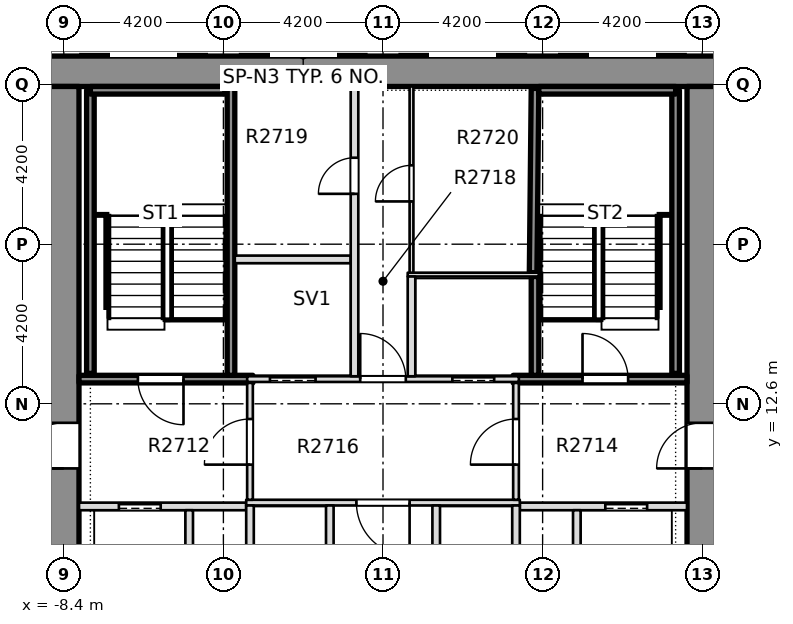
"""IFC4 building model, lengths in metres.
Left out: names, types, materials, properties, quantities, classifications, styles, units other than length and angle.
Written with IfcOpenShell. Run it as: python <this file> out.ifc"""

import sys

from ifc_helpers import new_model, si_unit, direction, frame, frame_2d, origin, place, context, subcontext, project, spatial, rectangle, extrude, element, fill, save


model = new_model("IFC4")
c1 = context("Model", 3, precision=1e-05, world=origin(), true_north=direction((0.0, 1.0)))
c2 = subcontext(c1, "Body", "Model", "MODEL_VIEW")
j1 = project(units=[si_unit("LENGTHUNIT", "METRE"), si_unit("PLANEANGLEUNIT", "RADIAN")], contexts=[c1])
p1 = place(None, origin())
s1 = spatial("IfcSite", under=j1, at=p1, CompositionType="ELEMENT")
p2 = place(p1, origin())
s2 = spatial("IfcBuilding", under=s1, at=p2, CompositionType="ELEMENT")
p3 = place(p2, frame((0.0, 0.0, 108.0)))
s3 = spatial("IfcBuildingStorey", under=s2, at=p3, CompositionType="ELEMENT", Elevation=108.0)
p4 = place(p3, frame((-11.8, 21.35, -0.32), z_axis=(0.0, 0.0, 1.0), x_axis=(1.0, 0.0, 0.0)))
e1 = element("IfcWall", 1, at=p4, inside=s3, PredefinedType="SHEAR", context=c2, shape_type="SweptSolid", body=[
    extrude(rectangle(XDim=23.6, YDim=0.8, at=frame_2d((11.8, 0.0))), origin(), (0.0, 0.0, 1.0), 3.45),
])
p5 = place(p3, frame((-8.4, -7.6, -0.32), z_axis=(0.0, 0.0, 1.0), x_axis=(0.0, 1.0, 0.0)))
e2 = element("IfcWall", 2, at=p5, inside=s3, PredefinedType="SHEAR", context=c2, shape_type="SweptSolid", body=[
    extrude(rectangle(XDim=28.55, YDim=0.8, at=frame_2d((14.275, 0.0))), origin(), (0.0, 0.0, 1.0), 3.45),
])
p6 = place(p5, frame((18.5, 0.0, 0.32)))
e3 = element("IfcOpeningElement", 3, at=p6, cuts=e2, PredefinedType="OPENING", context=c2, shape_type="SweptSolid", body=[
    extrude(rectangle(XDim=1.2, YDim=2.1, at=frame_2d((0.6, 1.05))), frame((0.0, 0.41, 0.0), z_axis=(0.0, -1.0, 0.0), x_axis=(1.0, 0.0, 0.0)), (0.0, 0.0, 1.0), 0.82),
])
p7 = place(p3, frame((8.4, -7.6, -0.32), z_axis=(0.0, 0.0, 1.0), x_axis=(0.0, 1.0, 0.0)))
e4 = element("IfcWall", 4, at=p7, inside=s3, PredefinedType="SHEAR", context=c2, shape_type="SweptSolid", body=[
    extrude(rectangle(XDim=28.55, YDim=0.8, at=frame_2d((14.275, 0.0))), origin(), (0.0, 0.0, 1.0), 3.45),
])
p8 = place(p7, frame((18.5, 0.0, 0.32)))
e5 = element("IfcOpeningElement", 5, at=p8, cuts=e4, PredefinedType="OPENING", context=c2, shape_type="SweptSolid", body=[
    extrude(rectangle(XDim=1.2, YDim=2.1, at=frame_2d((0.6, 1.05))), frame((0.0, 0.41, 0.0), z_axis=(0.0, -1.0, 0.0), x_axis=(1.0, 0.0, 0.0)), (0.0, 0.0, 1.0), 0.82),
])
p9 = place(p3, frame((-7.999, 9.9, 0.0), z_axis=(0.0, 0.0, 1.0), x_axis=(1.0, 0.0, 0.0)))
e6 = element("IfcWall", 6, at=p9, inside=s3, PredefinedType="PARTITIONING", context=c2, shape_type="SweptSolid", body=[
    extrude(rectangle(XDim=4.399, YDim=0.2, at=frame_2d((2.199, 0.0))), origin(), (0.0, 0.0, 1.0), 3.13),
])
p10 = place(p9, frame((1.049, 0.0, 0.0)))
e7 = element("IfcOpeningElement", 7, at=p10, cuts=e6, PredefinedType="OPENING", context=c2, shape_type="SweptSolid", body=[
    extrude(rectangle(XDim=1.1, YDim=2.1, at=frame_2d((0.55, 1.05))), frame((0.0, 0.11, 0.0), z_axis=(0.0, -1.0, 0.0), x_axis=(1.0, 0.0, 0.0)), (0.0, 0.0, 1.0), 0.22),
])
p11 = place(p3, frame((3.6, 9.9, 0.0), z_axis=(0.0, 0.0, 1.0), x_axis=(1.0, 0.0, 0.0)))
e8 = element("IfcWall", 8, at=p11, inside=s3, PredefinedType="PARTITIONING", context=c2, shape_type="SweptSolid", body=[
    extrude(rectangle(XDim=4.399, YDim=0.2, at=frame_2d((2.199, 0.0))), origin(), (0.0, 0.0, 1.0), 3.13),
])
p12 = place(p11, frame((2.25, 0.0, 0.0)))
e9 = element("IfcOpeningElement", 9, at=p12, cuts=e8, PredefinedType="OPENING", context=c2, shape_type="SweptSolid", body=[
    extrude(rectangle(XDim=1.1, YDim=2.1, at=frame_2d((0.55, 1.05))), frame((0.0, 0.11, 0.0), z_axis=(0.0, -1.0, 0.0), x_axis=(1.0, 0.0, 0.0)), (0.0, 0.0, 1.0), 0.22),
])
p13 = place(p3, frame((-3.6, 10.0, 0.0), z_axis=(0.0, 0.0, 1.0), x_axis=(1.0, 0.0, 0.0)))
e10 = element("IfcWall", 10, at=p13, inside=s3, PredefinedType="PARTITIONING", context=c2, shape_type="SweptSolid", body=[
    extrude(rectangle(XDim=7.2, YDim=0.15, at=frame_2d((3.6, 0.0))), origin(), (0.0, 0.0, 1.0), 3.13),
])
p14 = place(p13, frame((2.9, 0.0, 0.0)))
e11 = element("IfcOpeningElement", 11, at=p14, cuts=e10, PredefinedType="OPENING", context=c2, shape_type="SweptSolid", body=[
    extrude(rectangle(XDim=1.4, YDim=2.1, at=frame_2d((0.7, 1.05))), frame((0.0, 0.085, 0.0), z_axis=(0.0, -1.0, 0.0), x_axis=(1.0, 0.0, 0.0)), (0.0, 0.0, 1.0), 0.17),
])
p15 = place(p3, frame((-7.999, 13.25, 0.0), z_axis=(0.0, 0.0, 1.0), x_axis=(1.0, 0.0, 0.0)))
e12 = element("IfcWall", 12, at=p15, inside=s3, PredefinedType="SOLIDWALL", context=c2, shape_type="SweptSolid", body=[
    extrude(rectangle(XDim=4.574, YDim=0.2, at=frame_2d((2.287, 0.0))), origin(), (0.0, 0.0, 1.0), 3.13),
])
p16 = place(p15, frame((1.549, 0.0, 0.0)))
e13 = element("IfcOpeningElement", 13, at=p16, cuts=e12, PredefinedType="OPENING", context=c2, shape_type="SweptSolid", body=[
    extrude(rectangle(XDim=1.2, YDim=2.1, at=frame_2d((0.6, 1.05))), frame((0.0, 0.11, 0.0), z_axis=(0.0, -1.0, 0.0), x_axis=(1.0, 0.0, 0.0)), (0.0, 0.0, 1.0), 0.22),
])
p17 = place(p3, frame((-3.575, 13.25, 0.0), z_axis=(0.0, 0.0, 1.0), x_axis=(1.0, 0.0, 0.0)))
e14 = element("IfcWall", 14, at=p17, inside=s3, PredefinedType="PARTITIONING", context=c2, shape_type="SweptSolid", body=[
    extrude(rectangle(XDim=7.15, YDim=0.15, at=frame_2d((3.575, 0.0))), origin(), (0.0, 0.0, 1.0), 3.13),
])
p18 = place(p17, frame((0.6, 0.0, 0.0)))
e15 = element("IfcOpeningElement", 15, at=p18, cuts=e14, PredefinedType="OPENING", context=c2, shape_type="SweptSolid", body=[
    extrude(rectangle(XDim=1.2, YDim=2.1, at=frame_2d((0.6, 1.05))), frame((0.0, 0.085, 0.0), z_axis=(0.0, -1.0, 0.0), x_axis=(1.0, 0.0, 0.0)), (0.0, 0.0, 1.0), 0.17),
])
p19 = place(p17, frame((5.4, 0.0, 0.0)))
e16 = element("IfcOpeningElement", 16, at=p19, cuts=e14, PredefinedType="OPENING", context=c2, shape_type="SweptSolid", body=[
    extrude(rectangle(XDim=1.1, YDim=2.1, at=frame_2d((0.55, 1.05))), frame((0.0, 0.085, 0.0), z_axis=(0.0, -1.0, 0.0), x_axis=(1.0, 0.0, 0.0)), (0.0, 0.0, 1.0), 0.17),
])
p20 = place(p17, frame((2.975, 0.0, 0.0)))
e17 = element("IfcOpeningElement", 17, at=p20, cuts=e14, PredefinedType="OPENING", context=c2, shape_type="SweptSolid", body=[
    extrude(rectangle(XDim=1.2, YDim=2.1, at=frame_2d((0.6, 1.05))), frame((0.0, 0.085, 0.0), z_axis=(0.0, -1.0, 0.0), x_axis=(1.0, 0.0, 0.0)), (0.0, 0.0, 1.0), 0.17),
])
p21 = place(p3, frame((3.425, 13.25, 0.0), z_axis=(0.0, 0.0, 1.0), x_axis=(1.0, 0.0, 0.0)))
e18 = element("IfcWall", 18, at=p21, inside=s3, PredefinedType="SOLIDWALL", context=c2, shape_type="SweptSolid", body=[
    extrude(rectangle(XDim=4.574, YDim=0.2, at=frame_2d((2.287, 0.0))), origin(), (0.0, 0.0, 1.0), 3.13),
])
p22 = place(p21, frame((1.825, 0.0, 0.0)))
e19 = element("IfcOpeningElement", 19, at=p22, cuts=e18, PredefinedType="OPENING", context=c2, shape_type="SweptSolid", body=[
    extrude(rectangle(XDim=1.2, YDim=2.1, at=frame_2d((0.6, 1.05))), frame((0.0, 0.11, 0.0), z_axis=(0.0, -1.0, 0.0), x_axis=(1.0, 0.0, 0.0)), (0.0, 0.0, 1.0), 0.22),
])
p23 = place(p3, frame((0.65, 16.0, 0.0), z_axis=(0.0, 0.0, 1.0), x_axis=(1.0, 0.0, 0.0)))
e20 = element("IfcWall", 20, at=p23, inside=s3, PredefinedType="PARTITIONING", context=c2, shape_type="SweptSolid", body=[
    extrude(rectangle(XDim=3.45, YDim=0.1, at=frame_2d((1.725, 0.0))), origin(), (0.0, 0.0, 1.0), 3.13),
])
p24 = place(p3, frame((-3.9, 16.4, 0.0), z_axis=(0.0, 0.0, 1.0), x_axis=(1.0, 0.0, 0.0)))
e21 = element("IfcWall", 21, at=p24, inside=s3, PredefinedType="PARTITIONING", context=c2, shape_type="SweptSolid", body=[
    extrude(rectangle(XDim=3.05, YDim=0.2, at=frame_2d((1.525, 0.0))), origin(), (0.0, 0.0, 1.0), 3.13),
])
p25 = place(p3, frame((-5.1, 7.075, 0.0), z_axis=(0.0, 0.0, 1.0), x_axis=(0.0, 1.0, 0.0)))
e22 = element("IfcWall", 22, at=p25, inside=s3, PredefinedType="PARTITIONING", context=c2, shape_type="SweptSolid", body=[
    extrude(rectangle(XDim=2.725, YDim=0.2, at=frame_2d((1.363, 0.0))), origin(), (0.0, 0.0, 1.0), 3.13),
])
p26 = place(p3, frame((-4.0, 13.35, 0.0), z_axis=(0.0, 0.0, 1.0), x_axis=(0.0, 1.0, 0.0)))
e23 = element("IfcWall", 23, at=p26, inside=s3, PredefinedType="SOLIDWALL", context=c2, shape_type="SweptSolid", body=[
    extrude(rectangle(XDim=7.599, YDim=0.2, at=frame_2d((3.799, 0.0))), origin(), (0.0, 0.0, 1.0), 3.13),
])
p27 = place(p3, frame((-3.5, 7.075, 0.0), z_axis=(0.0, 0.0, 1.0), x_axis=(0.0, 1.0, 0.0)))
e24 = element("IfcWall", 24, at=p27, inside=s3, PredefinedType="PARTITIONING", context=c2, shape_type="SweptSolid", body=[
    extrude(rectangle(XDim=2.85, YDim=0.2, at=frame_2d((1.425, 0.0))), origin(), (0.0, 0.0, 1.0), 3.13),
])
p28 = place(p3, frame((-3.5, 10.075, 0.0), z_axis=(0.0, 0.0, 1.0), x_axis=(0.0, 1.0, 0.0)))
e25 = element("IfcWall", 25, at=p28, inside=s3, PredefinedType="PARTITIONING", context=c2, shape_type="SweptSolid", body=[
    extrude(rectangle(XDim=3.075, YDim=0.15, at=frame_2d((1.538, 0.0))), origin(), (0.0, 0.0, 1.0), 3.13),
])
p29 = place(p28, frame((0.925, 0.0, 0.0)))
e26 = element("IfcOpeningElement", 26, at=p29, cuts=e25, PredefinedType="OPENING", context=c2, shape_type="SweptSolid", body=[
    extrude(rectangle(XDim=1.2, YDim=2.1, at=frame_2d((0.6, 1.05))), frame((0.0, 0.085, 0.0), z_axis=(0.0, -1.0, 0.0), x_axis=(1.0, 0.0, 0.0)), (0.0, 0.0, 1.0), 0.17),
])
p30 = place(p3, frame((-1.4, 7.075, 0.0), z_axis=(0.0, 0.0, 1.0), x_axis=(0.0, 1.0, 0.0)))
e27 = element("IfcWall", 27, at=p30, inside=s3, PredefinedType="PARTITIONING", context=c2, shape_type="SweptSolid", body=[
    extrude(rectangle(XDim=2.85, YDim=0.2, at=frame_2d((1.425, 0.0))), origin(), (0.0, 0.0, 1.0), 3.13),
])
p31 = place(p3, frame((-0.75, 13.325, 0.0), z_axis=(0.0, 0.0, 1.0), x_axis=(0.0, 1.0, 0.0)))
e28 = element("IfcWall", 28, at=p31, inside=s3, PredefinedType="PARTITIONING", context=c2, shape_type="SweptSolid", body=[
    extrude(rectangle(XDim=7.624, YDim=0.2, at=frame_2d((3.812, 0.0))), origin(), (0.0, 0.0, 1.0), 3.13),
])
p32 = place(p31, frame((4.8, 0.0, 0.0)))
e29 = element("IfcOpeningElement", 29, at=p32, cuts=e28, PredefinedType="OPENING", context=c2, shape_type="SweptSolid", body=[
    extrude(rectangle(XDim=0.95, YDim=2.1, at=frame_2d((0.475, 1.05))), frame((0.0, 0.11, 0.0), z_axis=(0.0, -1.0, 0.0), x_axis=(1.0, 0.0, 0.0)), (0.0, 0.0, 1.0), 0.22),
])
p33 = place(p3, frame((0.75, 13.325, 0.0), z_axis=(0.0, 0.0, 1.0), x_axis=(0.0, 1.0, 0.0)))
e30 = element("IfcWall", 30, at=p33, inside=s3, PredefinedType="PARTITIONING", context=c2, shape_type="SweptSolid", body=[
    extrude(rectangle(XDim=2.625, YDim=0.2, at=frame_2d((1.312, 0.0))), origin(), (0.0, 0.0, 1.0), 3.13),
])
p34 = place(p3, frame((0.75, 16.05, 0.0), z_axis=(0.0, 0.0, 1.0), x_axis=(0.0, 1.0, 0.0)))
e31 = element("IfcWall", 31, at=p34, inside=s3, PredefinedType="PARTITIONING", context=c2, shape_type="SweptSolid", body=[
    extrude(rectangle(XDim=4.899, YDim=0.1, at=frame_2d((2.449, 0.0))), origin(), (0.0, 0.0, 1.0), 3.13),
])
p35 = place(p34, frame((1.875, 0.0, 0.0)))
e32 = element("IfcOpeningElement", 32, at=p35, cuts=e31, PredefinedType="OPENING", context=c2, shape_type="SweptSolid", body=[
    extrude(rectangle(XDim=0.95, YDim=2.1, at=frame_2d((0.475, 1.05))), frame((0.0, 0.06, 0.0), z_axis=(0.0, -1.0, 0.0), x_axis=(1.0, 0.0, 0.0)), (0.0, 0.0, 1.0), 0.12),
])
for number, where, z_axis, x_axis in (
    (33, (1.4, 7.075, 0.0), (0.0, 0.0, 1.0), (0.0, 1.0, 0.0)),
    (34, (3.5, 7.075, 0.0), (0.0, 0.0, 1.0), (0.0, 1.0, 0.0)),
):
    element("IfcWall", number, at=place(p3, frame(where, z_axis=z_axis, x_axis=x_axis)), inside=s3, PredefinedType="PARTITIONING", context=c2, shape_type="SweptSolid", body=[
        extrude(rectangle(XDim=2.85, YDim=0.2, at=frame_2d((1.425, 0.0))), origin(), (0.0, 0.0, 1.0), 3.13),
    ])
p36 = place(p3, frame((3.5, 10.075, 0.0), z_axis=(0.0, 0.0, 1.0), x_axis=(0.0, 1.0, 0.0)))
e35 = element("IfcWall", 35, at=p36, inside=s3, PredefinedType="PARTITIONING", context=c2, shape_type="SweptSolid", body=[
    extrude(rectangle(XDim=3.075, YDim=0.15, at=frame_2d((1.538, 0.0))), origin(), (0.0, 0.0, 1.0), 3.13),
])
p37 = place(p36, frame((0.925, 0.0, 0.0)))
e36 = element("IfcOpeningElement", 36, at=p37, cuts=e35, PredefinedType="OPENING", context=c2, shape_type="SweptSolid", body=[
    extrude(rectangle(XDim=1.2, YDim=2.1, at=frame_2d((0.6, 1.05))), frame((0.0, 0.085, 0.0), z_axis=(0.0, -1.0, 0.0), x_axis=(1.0, 0.0, 0.0)), (0.0, 0.0, 1.0), 0.17),
])
p38 = place(p3, frame((4.0, 13.35, 0.0), z_axis=(0.0, 0.0, 1.0), x_axis=(0.0, 1.0, 0.0)))
e37 = element("IfcWall", 37, at=p38, inside=s3, PredefinedType="SOLIDWALL", context=c2, shape_type="SweptSolid", body=[
    extrude(rectangle(XDim=2.6, YDim=0.2, at=frame_2d((1.3, 0.0))), origin(), (0.0, 0.0, 1.0), 3.13),
])
p39 = place(p3, frame((3.95, 16.05, 0.0), z_axis=(0.0, 0.0, 1.0), x_axis=(0.01032118628, 0.999946735138, 0.0)))
e38 = element("IfcWall", 38, at=p39, inside=s3, PredefinedType="SOLIDWALL", context=c2, shape_type="SweptSolid", body=[
    extrude(rectangle(XDim=4.849, YDim=0.2, at=frame_2d((2.425, 0.0))), origin(), (0.0, 0.0, 1.0), 3.13),
])
p40 = place(p3, frame((5.1, 7.075, 0.0), z_axis=(0.0, 0.0, 1.0), x_axis=(0.0, 1.0, 0.0)))
e39 = element("IfcWall", 39, at=p40, inside=s3, PredefinedType="PARTITIONING", context=c2, shape_type="SweptSolid", body=[
    extrude(rectangle(XDim=2.725, YDim=0.2, at=frame_2d((1.363, 0.0))), origin(), (0.0, 0.0, 1.0), 3.13),
])
p41 = place(p3, frame((-7.7, 13.4, 0.0), z_axis=(0.0, 0.0, 1.0), x_axis=(0.0, 1.0, 0.0)))
e40 = element("IfcWall", 40, at=p41, inside=s3, PredefinedType="SOLIDWALL", context=c2, shape_type="SweptSolid", body=[
    extrude(rectangle(XDim=7.45, YDim=0.2, at=frame_2d((3.725, 0.0))), origin(), (0.0, 0.0, 1.0), 3.13),
])
p42 = place(p3, frame((-7.7, 20.85, 0.0), z_axis=(0.0, 0.0, 1.0), x_axis=(1.0, 0.0, 0.0)))
e41 = element("IfcWall", 41, at=p42, inside=s3, PredefinedType="SOLIDWALL", context=c2, shape_type="SweptSolid", body=[
    extrude(rectangle(XDim=3.55, YDim=0.2, at=frame_2d((1.775, 0.0))), origin(), (0.0, 0.0, 1.0), 3.13),
])
p43 = place(p3, frame((7.7, 13.4, 0.0), z_axis=(0.0, 0.0, 1.0), x_axis=(0.0, 1.0, 0.0)))
e42 = element("IfcWall", 42, at=p43, inside=s3, PredefinedType="SOLIDWALL", context=c2, shape_type="SweptSolid", body=[
    extrude(rectangle(XDim=7.45, YDim=0.2, at=frame_2d((3.725, 0.0))), origin(), (0.0, 0.0, 1.0), 3.13),
])
p44 = place(p3, frame((4.1, 20.85, 0.0), z_axis=(0.0, 0.0, 1.0), x_axis=(1.0, 0.0, 0.0)))
e43 = element("IfcWall", 43, at=p44, inside=s3, PredefinedType="SOLIDWALL", context=c2, shape_type="SweptSolid", body=[
    extrude(rectangle(XDim=3.6, YDim=0.2, at=frame_2d((1.8, 0.0))), origin(), (0.0, 0.0, 1.0), 3.13),
])
p45 = place(p16, origin())
e44 = element("IfcDoor", 44, at=p45, inside=s3, OperationType="SINGLE_SWING_LEFT", PredefinedType="DOOR", context=c2, shape_type="SweptSolid", body=[
    extrude(rectangle(XDim=1.2, YDim=2.1, at=frame_2d((0.6, 1.05))), frame((0.0, 0.025, 0.0), z_axis=(0.0, -1.0, 0.0), x_axis=(1.0, 0.0, 0.0)), (0.0, 0.0, 1.0), 0.05),
])
fill(e13, e44)
p46 = place(p10, origin())
e45 = element("IfcDoor", 45, at=p46, inside=s3, OperationType="SLIDING_TO_LEFT", PredefinedType="DOOR", context=c2, shape_type="SweptSolid", body=[
    extrude(rectangle(XDim=1.1, YDim=2.1, at=frame_2d((0.55, 1.05))), frame((0.0, 0.025, 0.0), z_axis=(0.0, -1.0, 0.0), x_axis=(1.0, 0.0, 0.0)), (0.0, 0.0, 1.0), 0.05),
])
fill(e7, e45)
p47 = place(p22, origin())
e46 = element("IfcDoor", 46, at=p47, inside=s3, OperationType="SINGLE_SWING_RIGHT", PredefinedType="DOOR", context=c2, shape_type="SweptSolid", body=[
    extrude(rectangle(XDim=1.2, YDim=2.1, at=frame_2d((0.6, 1.05))), frame((0.0, 0.025, 0.0), z_axis=(0.0, -1.0, 0.0), x_axis=(1.0, 0.0, 0.0)), (0.0, 0.0, 1.0), 0.05),
])
fill(e19, e46)
p48 = place(p12, origin())
e47 = element("IfcDoor", 47, at=p48, inside=s3, OperationType="SLIDING_TO_LEFT", PredefinedType="DOOR", context=c2, shape_type="SweptSolid", body=[
    extrude(rectangle(XDim=1.1, YDim=2.1, at=frame_2d((0.55, 1.05))), frame((0.0, 0.025, 0.0), z_axis=(0.0, -1.0, 0.0), x_axis=(1.0, 0.0, 0.0)), (0.0, 0.0, 1.0), 0.05),
])
fill(e9, e47)
p49 = place(p14, origin())
e48 = element("IfcDoor", 48, at=p49, inside=s3, OperationType="SINGLE_SWING_RIGHT", PredefinedType="DOOR", context=c2, shape_type="SweptSolid", body=[
    extrude(rectangle(XDim=1.4, YDim=2.1, at=frame_2d((0.7, 1.05))), frame((0.0, 0.025, 0.0), z_axis=(0.0, -1.0, 0.0), x_axis=(1.0, 0.0, 0.0)), (0.0, 0.0, 1.0), 0.05),
])
fill(e11, e48)
p50 = place(p18, origin())
e49 = element("IfcDoor", 49, at=p50, inside=s3, OperationType="SLIDING_TO_RIGHT", PredefinedType="DOOR", context=c2, shape_type="SweptSolid", body=[
    extrude(rectangle(XDim=1.2, YDim=2.1, at=frame_2d((0.6, 1.05))), frame((0.0, 0.025, 0.0), z_axis=(0.0, -1.0, 0.0), x_axis=(1.0, 0.0, 0.0)), (0.0, 0.0, 1.0), 0.05),
])
fill(e15, e49)
p51 = place(p19, origin())
e50 = element("IfcDoor", 50, at=p51, inside=s3, OperationType="SLIDING_TO_LEFT", PredefinedType="DOOR", context=c2, shape_type="SweptSolid", body=[
    extrude(rectangle(XDim=1.1, YDim=2.1, at=frame_2d((0.55, 1.05))), frame((0.0, 0.025, 0.0), z_axis=(0.0, -1.0, 0.0), x_axis=(1.0, 0.0, 0.0)), (0.0, 0.0, 1.0), 0.05),
])
fill(e16, e50)
p52 = place(p20, origin())
e51 = element("IfcDoor", 51, at=p52, inside=s3, OperationType="SINGLE_SWING_RIGHT", PredefinedType="DOOR", context=c2, shape_type="SweptSolid", body=[
    extrude(rectangle(XDim=1.2, YDim=2.1, at=frame_2d((0.6, 1.05))), frame((0.0, 0.025, 0.0), z_axis=(0.0, -1.0, 0.0), x_axis=(1.0, 0.0, 0.0)), (0.0, 0.0, 1.0), 0.05),
])
fill(e17, e51)
p53 = place(p32, origin())
e52 = element("IfcDoor", 52, at=p53, inside=s3, OperationType="SINGLE_SWING_RIGHT", PredefinedType="DOOR", context=c2, shape_type="SweptSolid", body=[
    extrude(rectangle(XDim=0.95, YDim=2.1, at=frame_2d((0.475, 1.05))), frame((0.0, 0.025, 0.0), z_axis=(0.0, -1.0, 0.0), x_axis=(1.0, 0.0, 0.0)), (0.0, 0.0, 1.0), 0.05),
])
fill(e29, e52)
p54 = place(p35, origin())
e53 = element("IfcDoor", 53, at=p54, inside=s3, OperationType="SINGLE_SWING_LEFT", PredefinedType="DOOR", context=c2, shape_type="SweptSolid", body=[
    extrude(rectangle(XDim=0.95, YDim=2.1, at=frame_2d((0.475, 1.05))), frame((0.0, 0.025, 0.0), z_axis=(0.0, -1.0, 0.0), x_axis=(1.0, 0.0, 0.0)), (0.0, 0.0, 1.0), 0.05),
])
fill(e32, e53)
p55 = place(p29, origin())
e54 = element("IfcDoor", 54, at=p55, inside=s3, OperationType="SINGLE_SWING_RIGHT", PredefinedType="DOOR", context=c2, shape_type="SweptSolid", body=[
    extrude(rectangle(XDim=1.2, YDim=2.1, at=frame_2d((0.6, 1.05))), frame((0.0, 0.025, 0.0), z_axis=(0.0, -1.0, 0.0), x_axis=(1.0, 0.0, 0.0)), (0.0, 0.0, 1.0), 0.05),
])
fill(e26, e54)
p56 = place(p37, origin())
e55 = element("IfcDoor", 55, at=p56, inside=s3, OperationType="SINGLE_SWING_LEFT", PredefinedType="DOOR", context=c2, shape_type="SweptSolid", body=[
    extrude(rectangle(XDim=1.2, YDim=2.1, at=frame_2d((0.6, 1.05))), frame((0.0, 0.025, 0.0), z_axis=(0.0, -1.0, 0.0), x_axis=(1.0, 0.0, 0.0)), (0.0, 0.0, 1.0), 0.05),
])
fill(e36, e55)
p57 = place(p6, origin())
e56 = element("IfcDoor", 56, at=p57, inside=s3, OperationType="SINGLE_SWING_LEFT", PredefinedType="DOOR", context=c2, shape_type="SweptSolid", body=[
    extrude(rectangle(XDim=1.2, YDim=2.1, at=frame_2d((0.6, 1.05))), frame((0.0, 0.025, 0.0), z_axis=(0.0, -1.0, 0.0), x_axis=(1.0, 0.0, 0.0)), (0.0, 0.0, 1.0), 0.05),
])
fill(e3, e56)
p58 = place(p8, origin())
e57 = element("IfcDoor", 57, at=p58, inside=s3, OperationType="SINGLE_SWING_LEFT", PredefinedType="DOOR", context=c2, shape_type="SweptSolid", body=[
    extrude(rectangle(XDim=1.2, YDim=2.1, at=frame_2d((0.6, 1.05))), frame((0.0, 0.025, 0.0), z_axis=(0.0, -1.0, 0.0), x_axis=(1.0, 0.0, 0.0)), (0.0, 0.0, 1.0), 0.05),
])
fill(e5, e57)
save(model, sys.argv[1])
